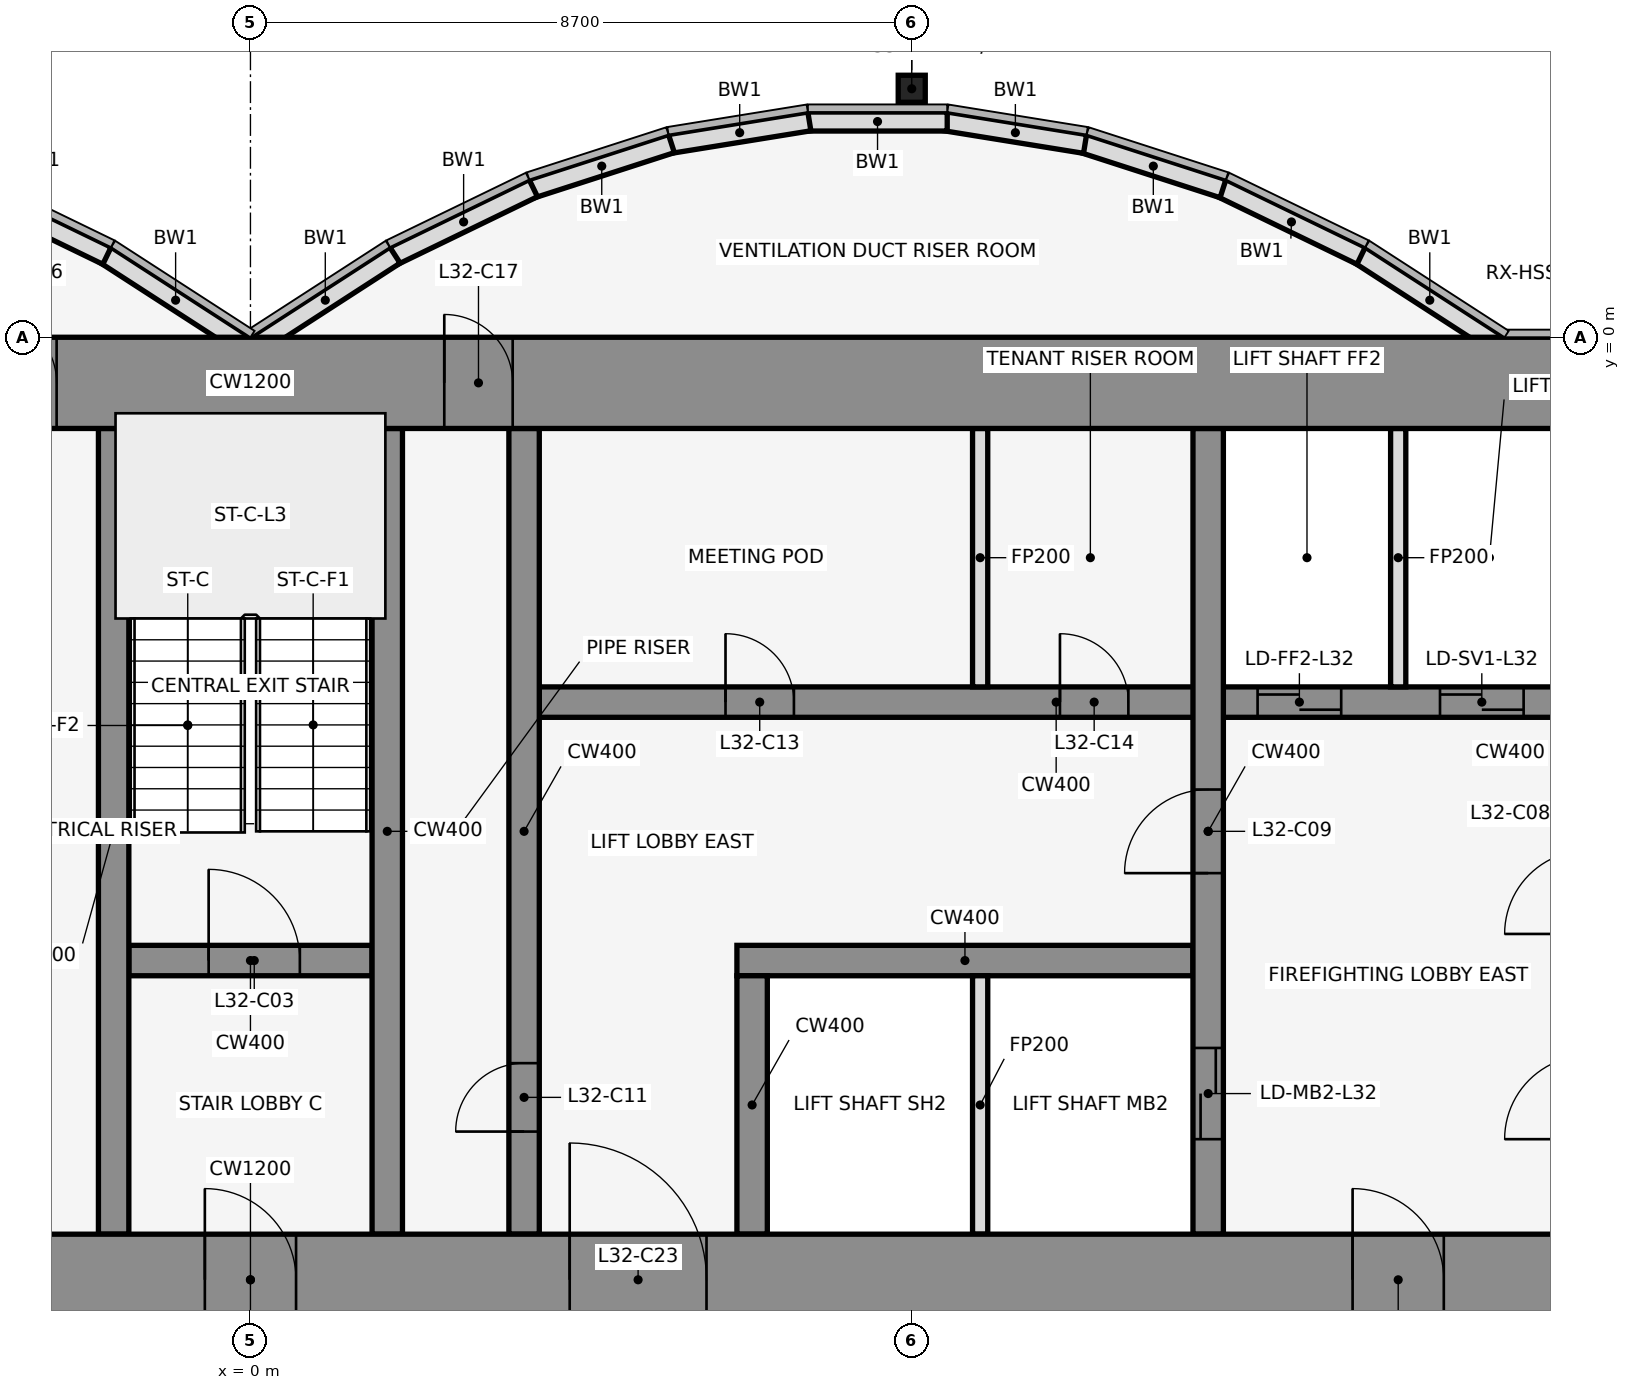
"""IFC4 building model, lengths in metres.
Left out: names, types, materials, properties, quantities, classifications, styles, units other than length and angle.
Written with IfcOpenShell. Run it as: python <this file> out.ifc"""

import sys

from ifc_helpers import new_model, si_unit, direction, frame, frame_2d, origin, origin_2d, place, context, subcontext, project, spatial, rectangle, hollow_rectangle, extrude, element, fill, save


model = new_model("IFC4")
c1 = context("Model", 3, precision=1e-05, world=origin(), true_north=direction((0.0, 1.0)))
c2 = subcontext(c1, "Body", "Model", "MODEL_VIEW")
j1 = project(units=[si_unit("LENGTHUNIT", "METRE"), si_unit("PLANEANGLEUNIT", "RADIAN")], contexts=[c1])
p1 = place(None, origin())
s1 = spatial("IfcSite", under=j1, at=p1, CompositionType="ELEMENT")
p2 = place(p1, origin())
s2 = spatial("IfcBuilding", under=s1, at=p2, CompositionType="ELEMENT")
p3 = place(p2, frame((0.0, 0.0, 148.6)))
s3 = spatial("IfcBuildingStorey", under=s2, at=p3, CompositionType="ELEMENT", Elevation=148.6)
p4 = place(p3, frame((8.7, 3.269, 0.0), z_axis=(0.0, 0.0, 1.0), x_axis=(1.0, 0.0, 0.0)))
e1 = element("IfcColumn", 1, at=p4, inside=s3, PredefinedType="COLUMN", context=c2, shape_type="SweptSolid", body=[
    extrude(hollow_rectangle(XDim=0.356, YDim=0.356, WallThickness=0.012, at=origin_2d()), origin(), (0.0, 0.0, 1.0), 4.1),
])
p5 = place(p3, frame((16.432, -0.105, 0.0), z_axis=(0.0, 0.0, 1.0), x_axis=(-0.83981312244, 0.542875602121, 0.0)))
e2 = element("IfcWall", 2, at=p5, inside=s3, PredefinedType="STANDARD", context=c2, shape_type="SweptSolid", body=[
    extrude(rectangle(XDim=2.183, YDim=0.25, at=frame_2d((1.091, 0.0))), origin(), (0.0, 0.0, 1.0), 3.95),
])
p6 = place(p3, frame((14.612, 1.073, 0.0), z_axis=(0.0, 0.0, 1.0), x_axis=(-0.89982408427, 0.436252928206, 0.0)))
e3 = element("IfcWall", 3, at=p6, inside=s3, PredefinedType="STANDARD", context=c2, shape_type="SweptSolid", body=[
    extrude(rectangle(XDim=2.038, YDim=0.25, at=frame_2d((1.019, 0.0))), origin(), (0.0, 0.0, 1.0), 3.95),
])
p7 = place(p3, frame((12.795, 1.955, 0.0), z_axis=(0.0, 0.0, 1.0), x_axis=(-0.951495806175, 0.307661714928, 0.0)))
e4 = element("IfcWall", 4, at=p7, inside=s3, PredefinedType="STANDARD", context=c2, shape_type="SweptSolid", body=[
    extrude(rectangle(XDim=1.927, YDim=0.25, at=frame_2d((0.963, 0.0))), origin(), (0.0, 0.0, 1.0), 3.95),
])
p8 = place(p3, frame((10.98, 2.543, 0.0), z_axis=(0.0, 0.0, 1.0), x_axis=(-0.987181718931, 0.159600293885, 0.0)))
e5 = element("IfcWall", 5, at=p8, inside=s3, PredefinedType="STANDARD", context=c2, shape_type="SweptSolid", body=[
    extrude(rectangle(XDim=1.857, YDim=0.25, at=frame_2d((0.929, 0.0))), origin(), (0.0, 0.0, 1.0), 3.95),
])
p9 = place(p3, frame((9.167, 2.838, 0.0), z_axis=(0.0, 0.0, 1.0), x_axis=(-1.0, 0.0, 0.0)))
e6 = element("IfcWall", 6, at=p9, inside=s3, PredefinedType="STANDARD", context=c2, shape_type="SweptSolid", body=[
    extrude(rectangle(XDim=1.833, YDim=0.25, at=frame_2d((0.917, 0.0))), origin(), (0.0, 0.0, 1.0), 3.95),
])
p10 = place(p3, frame((7.353, 2.84, 0.0), z_axis=(0.0, 0.0, 1.0), x_axis=(-0.987181718931, -0.159600293885, 0.0)))
e7 = element("IfcWall", 7, at=p10, inside=s3, PredefinedType="STANDARD", context=c2, shape_type="SweptSolid", body=[
    extrude(rectangle(XDim=1.857, YDim=0.25, at=frame_2d((0.929, 0.0))), origin(), (0.0, 0.0, 1.0), 3.95),
])
p11 = place(p3, frame((5.538, 2.548, 0.0), z_axis=(0.0, 0.0, 1.0), x_axis=(-0.951495806175, -0.307661714928, 0.0)))
e8 = element("IfcWall", 8, at=p11, inside=s3, PredefinedType="STANDARD", context=c2, shape_type="SweptSolid", body=[
    extrude(rectangle(XDim=1.927, YDim=0.25, at=frame_2d((0.963, 0.0))), origin(), (0.0, 0.0, 1.0), 3.95),
])
p12 = place(p3, frame((3.721, 1.962, 0.0), z_axis=(0.0, 0.0, 1.0), x_axis=(-0.89982408427, -0.436252928206, 0.0)))
e9 = element("IfcWall", 9, at=p12, inside=s3, PredefinedType="STANDARD", context=c2, shape_type="SweptSolid", body=[
    extrude(rectangle(XDim=2.038, YDim=0.25, at=frame_2d((1.019, 0.0))), origin(), (0.0, 0.0, 1.0), 3.95),
])
for number, where, z_axis, x_axis in (
    (10, (1.901, 1.08, 0.0), (0.0, 0.0, 1.0), (-0.84, -0.543, 0.0)),
    (11, (-0.068, -0.105, 0.0), (0.0, 0.0, 1.0), (-0.84, 0.543, 0.0)),
):
    element("IfcWall", number, at=place(p3, frame(where, z_axis=z_axis, x_axis=x_axis)), inside=s3, PredefinedType="STANDARD", context=c2, shape_type="SweptSolid", body=[
        extrude(rectangle(XDim=2.183, YDim=0.25, at=frame_2d((1.091, 0.0))), origin(), (0.0, 0.0, 1.0), 3.95),
    ])
p13 = place(p3, frame((-1.888, 1.073, 0.0), z_axis=(0.0, 0.0, 1.0), x_axis=(-0.89982408427, 0.436252928206, 0.0)))
e12 = element("IfcWall", 12, at=p13, inside=s3, PredefinedType="STANDARD", context=c2, shape_type="SweptSolid", body=[
    extrude(rectangle(XDim=2.038, YDim=0.25, at=frame_2d((1.019, 0.0))), origin(), (0.0, 0.0, 1.0), 3.95),
])
p14 = place(p3, frame((-1.6, -8.2, 0.0), z_axis=(0.0, 0.0, 1.0), x_axis=(1.0, 0.0, 0.0)))
e13 = element("IfcWall", 13, at=p14, inside=s3, PredefinedType="SHEAR", context=c2, shape_type="SweptSolid", body=[
    extrude(rectangle(XDim=3.2, YDim=0.4, at=frame_2d((1.6, 0.0))), origin(), (0.0, 0.0, 1.0), 4.1),
])
p15 = place(p14, frame((1.05, 0.0, 0.0)))
e14 = element("IfcOpeningElement", 14, at=p15, cuts=e13, PredefinedType="OPENING", context=c2, shape_type="SweptSolid", body=[
    extrude(rectangle(XDim=1.2, YDim=2.1, at=frame_2d((0.6, 1.05))), frame((0.0, 0.212, 0.0), z_axis=(0.0, -1.0, 0.0), x_axis=(1.0, 0.0, 0.0)), (0.0, 0.0, 1.0), 0.424),
])
p16 = place(p3, frame((6.4, -8.2, 0.0), z_axis=(0.0, 0.0, 1.0), x_axis=(1.0, 0.0, 0.0)))
e15 = element("IfcWall", 15, at=p16, inside=s3, PredefinedType="SHEAR", context=c2, shape_type="SweptSolid", body=[
    extrude(rectangle(XDim=6.0, YDim=0.4, at=frame_2d((3.0, 0.0))), origin(), (0.0, 0.0, 1.0), 4.1),
])
p17 = place(p3, frame((3.8, -4.8, 0.0), z_axis=(0.0, 0.0, 1.0), x_axis=(1.0, 0.0, 0.0)))
e16 = element("IfcWall", 16, at=p17, inside=s3, PredefinedType="SHEAR", context=c2, shape_type="SweptSolid", body=[
    extrude(rectangle(XDim=13.6, YDim=0.4, at=frame_2d((6.8, 0.0))), origin(), (0.0, 0.0, 1.0), 4.1),
])
p18 = place(p17, frame((9.45, 0.0, 0.0)))
e17 = element("IfcOpeningElement", 17, at=p18, cuts=e16, PredefinedType="OPENING", context=c2, shape_type="SweptSolid", body=[
    extrude(rectangle(XDim=1.1, YDim=2.1, at=frame_2d((0.55, 1.05))), frame((0.0, 0.212, 0.0), z_axis=(0.0, -1.0, 0.0), x_axis=(1.0, 0.0, 0.0)), (0.0, 0.0, 1.0), 0.424),
])
p19 = place(p17, frame((11.85, 0.0, 0.0)))
e18 = element("IfcOpeningElement", 18, at=p19, cuts=e16, PredefinedType="OPENING", context=c2, shape_type="SweptSolid", body=[
    extrude(rectangle(XDim=1.1, YDim=2.1, at=frame_2d((0.55, 1.05))), frame((0.0, 0.212, 0.0), z_axis=(0.0, -1.0, 0.0), x_axis=(1.0, 0.0, 0.0)), (0.0, 0.0, 1.0), 0.424),
])
p20 = place(p17, frame((2.45, 0.0, 0.0)))
e19 = element("IfcOpeningElement", 19, at=p20, cuts=e16, PredefinedType="OPENING", context=c2, shape_type="SweptSolid", body=[
    extrude(rectangle(XDim=0.9, YDim=2.1, at=frame_2d((0.45, 1.05))), frame((0.0, 0.212, 0.0), z_axis=(0.0, -1.0, 0.0), x_axis=(1.0, 0.0, 0.0)), (0.0, 0.0, 1.0), 0.424),
])
p21 = place(p17, frame((6.85, 0.0, 0.0)))
e20 = element("IfcOpeningElement", 20, at=p21, cuts=e16, PredefinedType="OPENING", context=c2, shape_type="SweptSolid", body=[
    extrude(rectangle(XDim=0.9, YDim=2.1, at=frame_2d((0.45, 1.05))), frame((0.0, 0.212, 0.0), z_axis=(0.0, -1.0, 0.0), x_axis=(1.0, 0.0, 0.0)), (0.0, 0.0, 1.0), 0.424),
])
for number, where, z_axis, x_axis in (
    (21, (-1.8, -11.8, 0.0), (0.0, 0.0, 1.0), (0.0, 1.0, 0.0)),
    (22, (1.8, -11.8, 0.0), (0.0, 0.0, 1.0), (0.0, 1.0, 0.0)),
):
    element("IfcWall", number, at=place(p3, frame(where, z_axis=z_axis, x_axis=x_axis)), inside=s3, PredefinedType="SHEAR", context=c2, shape_type="SweptSolid", body=[
        extrude(rectangle(XDim=10.6, YDim=0.4, at=frame_2d((5.3, 0.0))), origin(), (0.0, 0.0, 1.0), 4.1),
    ])
p22 = place(p3, frame((3.6, -11.8, 0.0), z_axis=(0.0, 0.0, 1.0), x_axis=(0.0, 1.0, 0.0)))
e23 = element("IfcWall", 23, at=p22, inside=s3, PredefinedType="SHEAR", context=c2, shape_type="SweptSolid", body=[
    extrude(rectangle(XDim=10.6, YDim=0.4, at=frame_2d((5.3, 0.0))), origin(), (0.0, 0.0, 1.0), 4.1),
])
p23 = place(p22, frame((1.35, 0.0, 0.0)))
e24 = element("IfcOpeningElement", 24, at=p23, cuts=e23, PredefinedType="OPENING", context=c2, shape_type="SweptSolid", body=[
    extrude(rectangle(XDim=0.9, YDim=2.1, at=frame_2d((0.45, 1.05))), frame((0.0, 0.212, 0.0), z_axis=(0.0, -1.0, 0.0), x_axis=(1.0, 0.0, 0.0)), (0.0, 0.0, 1.0), 0.424),
])
p24 = place(p3, frame((6.6, -11.8, 0.0), z_axis=(0.0, 0.0, 1.0), x_axis=(0.0, 1.0, 0.0)))
e25 = element("IfcWall", 25, at=p24, inside=s3, PredefinedType="SHEAR", context=c2, shape_type="SweptSolid", body=[
    extrude(rectangle(XDim=3.4, YDim=0.4, at=frame_2d((1.7, 0.0))), origin(), (0.0, 0.0, 1.0), 4.1),
])
for number, where, z_axis, x_axis in (
    (26, (9.6, -11.8, 0.0), (0.0, 0.0, 1.0), (0.0, 1.0, 0.0)),
    (27, (9.6, -4.6, 0.0), (0.0, 0.0, 1.0), (0.0, 1.0, 0.0)),
):
    element("IfcWall", number, at=place(p3, frame(where, z_axis=z_axis, x_axis=x_axis)), inside=s3, PredefinedType="PARTITIONING", context=c2, shape_type="SweptSolid", body=[
        extrude(rectangle(XDim=3.4, YDim=0.2, at=frame_2d((1.7, 0.0))), origin(), (0.0, 0.0, 1.0), 2.84),
    ])
p25 = place(p3, frame((12.6, -11.8, 0.0), z_axis=(0.0, 0.0, 1.0), x_axis=(0.0, 1.0, 0.0)))
e28 = element("IfcWall", 28, at=p25, inside=s3, PredefinedType="SHEAR", context=c2, shape_type="SweptSolid", body=[
    extrude(rectangle(XDim=10.6, YDim=0.4, at=frame_2d((5.3, 0.0))), origin(), (0.0, 0.0, 1.0), 4.1),
])
p26 = place(p25, frame((1.25, 0.0, 0.0)))
e29 = element("IfcOpeningElement", 29, at=p26, cuts=e28, PredefinedType="OPENING", context=c2, shape_type="SweptSolid", body=[
    extrude(rectangle(XDim=1.2, YDim=2.1, at=frame_2d((0.6, 1.05))), frame((0.0, 0.212, 0.0), z_axis=(0.0, -1.0, 0.0), x_axis=(1.0, 0.0, 0.0)), (0.0, 0.0, 1.0), 0.424),
])
p27 = place(p25, frame((4.75, 0.0, 0.0)))
e30 = element("IfcOpeningElement", 30, at=p27, cuts=e28, PredefinedType="OPENING", context=c2, shape_type="SweptSolid", body=[
    extrude(rectangle(XDim=1.1, YDim=2.1, at=frame_2d((0.55, 1.05))), frame((0.0, 0.212, 0.0), z_axis=(0.0, -1.0, 0.0), x_axis=(1.0, 0.0, 0.0)), (0.0, 0.0, 1.0), 0.424),
])
p28 = place(p3, frame((15.1, -4.6, 0.0), z_axis=(0.0, 0.0, 1.0), x_axis=(0.0, 1.0, 0.0)))
e31 = element("IfcWall", 31, at=p28, inside=s3, PredefinedType="PARTITIONING", context=c2, shape_type="SweptSolid", body=[
    extrude(rectangle(XDim=3.4, YDim=0.2, at=frame_2d((1.7, 0.0))), origin(), (0.0, 0.0, 1.0), 2.84),
])
p29 = place(p3, frame((-22.0, -0.6, 0.0), z_axis=(0.0, 0.0, 1.0), x_axis=(1.0, 0.0, 0.0)))
e32 = element("IfcWall", 32, at=p29, inside=s3, PredefinedType="SHEAR", context=c2, shape_type="SweptSolid", body=[
    extrude(rectangle(XDim=44.0, YDim=1.2, at=frame_2d((22.0, 0.0))), origin(), (0.0, 0.0, 1.0), 4.1),
])
p30 = place(p29, frame((18.55, 0.0, 0.0)))
e33 = element("IfcOpeningElement", 33, at=p30, cuts=e32, PredefinedType="OPENING", context=c2, shape_type="SweptSolid", body=[
    extrude(rectangle(XDim=0.9, YDim=2.1, at=frame_2d((0.45, 1.05))), frame((0.0, 0.612, 0.0), z_axis=(0.0, -1.0, 0.0), x_axis=(1.0, 0.0, 0.0)), (0.0, 0.0, 1.0), 1.224),
])
p31 = place(p29, frame((24.55, 0.0, 0.0)))
e34 = element("IfcOpeningElement", 34, at=p31, cuts=e32, PredefinedType="OPENING", context=c2, shape_type="SweptSolid", body=[
    extrude(rectangle(XDim=0.9, YDim=2.1, at=frame_2d((0.45, 1.05))), frame((0.0, 0.612, 0.0), z_axis=(0.0, -1.0, 0.0), x_axis=(1.0, 0.0, 0.0)), (0.0, 0.0, 1.0), 1.224),
])
p32 = place(p3, frame((-22.0, -12.4, 0.0), z_axis=(0.0, 0.0, 1.0), x_axis=(1.0, 0.0, 0.0)))
e35 = element("IfcWall", 35, at=p32, inside=s3, PredefinedType="SHEAR", context=c2, shape_type="SweptSolid", body=[
    extrude(rectangle(XDim=44.0, YDim=1.2, at=frame_2d((22.0, 0.0))), origin(), (0.0, 0.0, 1.0), 4.1),
])
p33 = place(p32, frame((2.2, 0.0, 0.0)))
e36 = element("IfcOpeningElement", 36, at=p33, cuts=e35, PredefinedType="OPENING", context=c2, shape_type="SweptSolid", body=[
    extrude(rectangle(XDim=1.2, YDim=2.1, at=frame_2d((0.6, 1.05))), frame((0.0, 0.612, 0.0), z_axis=(0.0, -1.0, 0.0), x_axis=(1.0, 0.0, 0.0)), (0.0, 0.0, 1.0), 1.224),
])
p34 = place(p32, frame((21.4, 0.0, 0.0)))
e37 = element("IfcOpeningElement", 37, at=p34, cuts=e35, PredefinedType="OPENING", context=c2, shape_type="SweptSolid", body=[
    extrude(rectangle(XDim=1.2, YDim=2.1, at=frame_2d((0.6, 1.05))), frame((0.0, 0.612, 0.0), z_axis=(0.0, -1.0, 0.0), x_axis=(1.0, 0.0, 0.0)), (0.0, 0.0, 1.0), 1.224),
])
p35 = place(p32, frame((40.6, 0.0, 0.0)))
e38 = element("IfcOpeningElement", 38, at=p35, cuts=e35, PredefinedType="OPENING", context=c2, shape_type="SweptSolid", body=[
    extrude(rectangle(XDim=1.2, YDim=2.1, at=frame_2d((0.6, 1.05))), frame((0.0, 0.612, 0.0), z_axis=(0.0, -1.0, 0.0), x_axis=(1.0, 0.0, 0.0)), (0.0, 0.0, 1.0), 1.224),
])
p36 = place(p32, frame((16.0, 0.0, 0.0)))
e39 = element("IfcOpeningElement", 39, at=p36, cuts=e35, PredefinedType="OPENING", context=c2, shape_type="SweptSolid", body=[
    extrude(rectangle(XDim=1.8, YDim=2.1, at=frame_2d((0.9, 1.05))), frame((0.0, 0.612, 0.0), z_axis=(0.0, -1.0, 0.0), x_axis=(1.0, 0.0, 0.0)), (0.0, 0.0, 1.0), 1.224),
])
p37 = place(p32, frame((6.3, 0.0, 0.0)))
e40 = element("IfcOpeningElement", 40, at=p37, cuts=e35, PredefinedType="OPENING", context=c2, shape_type="SweptSolid", body=[
    extrude(rectangle(XDim=1.2, YDim=2.1, at=frame_2d((0.6, 1.05))), frame((0.0, 0.612, 0.0), z_axis=(0.0, -1.0, 0.0), x_axis=(1.0, 0.0, 0.0)), (0.0, 0.0, 1.0), 1.224),
])
p38 = place(p32, frame((26.2, 0.0, 0.0)))
e41 = element("IfcOpeningElement", 41, at=p38, cuts=e35, PredefinedType="OPENING", context=c2, shape_type="SweptSolid", body=[
    extrude(rectangle(XDim=1.8, YDim=2.1, at=frame_2d((0.9, 1.05))), frame((0.0, 0.612, 0.0), z_axis=(0.0, -1.0, 0.0), x_axis=(1.0, 0.0, 0.0)), (0.0, 0.0, 1.0), 1.224),
])
p39 = place(p32, frame((36.5, 0.0, 0.0)))
e42 = element("IfcOpeningElement", 42, at=p39, cuts=e35, PredefinedType="OPENING", context=c2, shape_type="SweptSolid", body=[
    extrude(rectangle(XDim=1.2, YDim=2.1, at=frame_2d((0.6, 1.05))), frame((0.0, 0.612, 0.0), z_axis=(0.0, -1.0, 0.0), x_axis=(1.0, 0.0, 0.0)), (0.0, 0.0, 1.0), 1.224),
])
p40 = place(p15, origin())
e43 = element("IfcDoor", 43, at=p40, inside=s3, OperationType="SINGLE_SWING_LEFT", PredefinedType="DOOR", context=c2, shape_type="SweptSolid", body=[
    extrude(rectangle(XDim=1.2, YDim=2.1, at=frame_2d((0.6, 1.05))), frame((0.0, 0.025, 0.0), z_axis=(0.0, -1.0, 0.0), x_axis=(1.0, 0.0, 0.0)), (0.0, 0.0, 1.0), 0.05),
])
fill(e14, e43)
p41 = place(p26, origin())
e44 = element("IfcDoor", 44, at=p41, inside=s3, OperationType="DOUBLE_DOOR_SLIDING", PredefinedType="DOOR", context=c2, shape_type="SweptSolid", body=[
    extrude(rectangle(XDim=1.2, YDim=2.1, at=frame_2d((0.6, 1.05))), frame((0.0, 0.025, 0.0), z_axis=(0.0, -1.0, 0.0), x_axis=(1.0, 0.0, 0.0)), (0.0, 0.0, 1.0), 0.05),
])
fill(e29, e44)
p42 = place(p18, origin())
e45 = element("IfcDoor", 45, at=p42, inside=s3, OperationType="DOUBLE_DOOR_SLIDING", PredefinedType="DOOR", context=c2, shape_type="SweptSolid", body=[
    extrude(rectangle(XDim=1.1, YDim=2.1, at=frame_2d((0.55, 1.05))), frame((0.0, 0.025, 0.0), z_axis=(0.0, -1.0, 0.0), x_axis=(1.0, 0.0, 0.0)), (0.0, 0.0, 1.0), 0.05),
])
fill(e17, e45)
p43 = place(p19, origin())
e46 = element("IfcDoor", 46, at=p43, inside=s3, OperationType="DOUBLE_DOOR_SLIDING", PredefinedType="DOOR", context=c2, shape_type="SweptSolid", body=[
    extrude(rectangle(XDim=1.1, YDim=2.1, at=frame_2d((0.55, 1.05))), frame((0.0, 0.025, 0.0), z_axis=(0.0, -1.0, 0.0), x_axis=(1.0, 0.0, 0.0)), (0.0, 0.0, 1.0), 0.05),
])
fill(e18, e46)
p44 = place(p27, frame((1.1, 0.0, 0.0), z_axis=(0.0, 0.0, 1.0), x_axis=(-1.0, 0.0, 0.0)))
e47 = element("IfcDoor", 47, at=p44, inside=s3, OperationType="SINGLE_SWING_RIGHT", PredefinedType="DOOR", context=c2, shape_type="SweptSolid", body=[
    extrude(rectangle(XDim=1.1, YDim=2.1, at=frame_2d((0.55, 1.05))), frame((0.0, 0.025, 0.0), z_axis=(0.0, -1.0, 0.0), x_axis=(1.0, 0.0, 0.0)), (0.0, 0.0, 1.0), 0.05),
])
fill(e30, e47)
p45 = place(p23, origin())
e48 = element("IfcDoor", 48, at=p45, inside=s3, OperationType="SINGLE_SWING_LEFT", PredefinedType="DOOR", context=c2, shape_type="SweptSolid", body=[
    extrude(rectangle(XDim=0.9, YDim=2.1, at=frame_2d((0.45, 1.05))), frame((0.0, 0.025, 0.0), z_axis=(0.0, -1.0, 0.0), x_axis=(1.0, 0.0, 0.0)), (0.0, 0.0, 1.0), 0.05),
])
fill(e24, e48)
p46 = place(p20, origin())
e49 = element("IfcDoor", 49, at=p46, inside=s3, OperationType="SINGLE_SWING_LEFT", PredefinedType="DOOR", context=c2, shape_type="SweptSolid", body=[
    extrude(rectangle(XDim=0.9, YDim=2.1, at=frame_2d((0.45, 1.05))), frame((0.0, 0.025, 0.0), z_axis=(0.0, -1.0, 0.0), x_axis=(1.0, 0.0, 0.0)), (0.0, 0.0, 1.0), 0.05),
])
fill(e19, e49)
p47 = place(p21, origin())
e50 = element("IfcDoor", 50, at=p47, inside=s3, OperationType="SINGLE_SWING_RIGHT", PredefinedType="DOOR", context=c2, shape_type="SweptSolid", body=[
    extrude(rectangle(XDim=0.9, YDim=2.1, at=frame_2d((0.45, 1.05))), frame((0.0, 0.025, 0.0), z_axis=(0.0, -1.0, 0.0), x_axis=(1.0, 0.0, 0.0)), (0.0, 0.0, 1.0), 0.05),
])
fill(e20, e50)
p48 = place(p30, origin())
e51 = element("IfcDoor", 51, at=p48, inside=s3, OperationType="SINGLE_SWING_LEFT", PredefinedType="DOOR", context=c2, shape_type="SweptSolid", body=[
    extrude(rectangle(XDim=0.9, YDim=2.1, at=frame_2d((0.45, 1.05))), frame((0.0, 0.025, 0.0), z_axis=(0.0, -1.0, 0.0), x_axis=(1.0, 0.0, 0.0)), (0.0, 0.0, 1.0), 0.05),
])
fill(e33, e51)
p49 = place(p31, origin())
e52 = element("IfcDoor", 52, at=p49, inside=s3, OperationType="SINGLE_SWING_LEFT", PredefinedType="DOOR", context=c2, shape_type="SweptSolid", body=[
    extrude(rectangle(XDim=0.9, YDim=2.1, at=frame_2d((0.45, 1.05))), frame((0.0, 0.025, 0.0), z_axis=(0.0, -1.0, 0.0), x_axis=(1.0, 0.0, 0.0)), (0.0, 0.0, 1.0), 0.05),
])
fill(e34, e52)
p50 = place(p34, frame((1.2, 0.0, 0.0), z_axis=(0.0, 0.0, 1.0), x_axis=(-1.0, 0.0, 0.0)))
e53 = element("IfcDoor", 53, at=p50, inside=s3, OperationType="SINGLE_SWING_RIGHT", PredefinedType="DOOR", context=c2, shape_type="SweptSolid", body=[
    extrude(rectangle(XDim=1.2, YDim=2.1, at=frame_2d((0.6, 1.05))), frame((0.0, 0.025, 0.0), z_axis=(0.0, -1.0, 0.0), x_axis=(1.0, 0.0, 0.0)), (0.0, 0.0, 1.0), 0.05),
])
fill(e37, e53)
p51 = place(p38, origin())
e54 = element("IfcDoor", 54, at=p51, inside=s3, OperationType="SINGLE_SWING_LEFT", PredefinedType="DOOR", context=c2, shape_type="SweptSolid", body=[
    extrude(rectangle(XDim=1.8, YDim=2.1, at=frame_2d((0.9, 1.05))), frame((0.0, 0.025, 0.0), z_axis=(0.0, -1.0, 0.0), x_axis=(1.0, 0.0, 0.0)), (0.0, 0.0, 1.0), 0.05),
])
fill(e41, e54)
p52 = place(p39, frame((1.2, 0.0, 0.0), z_axis=(0.0, 0.0, 1.0), x_axis=(-1.0, 0.0, 0.0)))
e55 = element("IfcDoor", 55, at=p52, inside=s3, OperationType="SINGLE_SWING_RIGHT", PredefinedType="DOOR", context=c2, shape_type="SweptSolid", body=[
    extrude(rectangle(XDim=1.2, YDim=2.1, at=frame_2d((0.6, 1.05))), frame((0.0, 0.025, 0.0), z_axis=(0.0, -1.0, 0.0), x_axis=(1.0, 0.0, 0.0)), (0.0, 0.0, 1.0), 0.05),
])
fill(e42, e55)
save(model, sys.argv[1])
